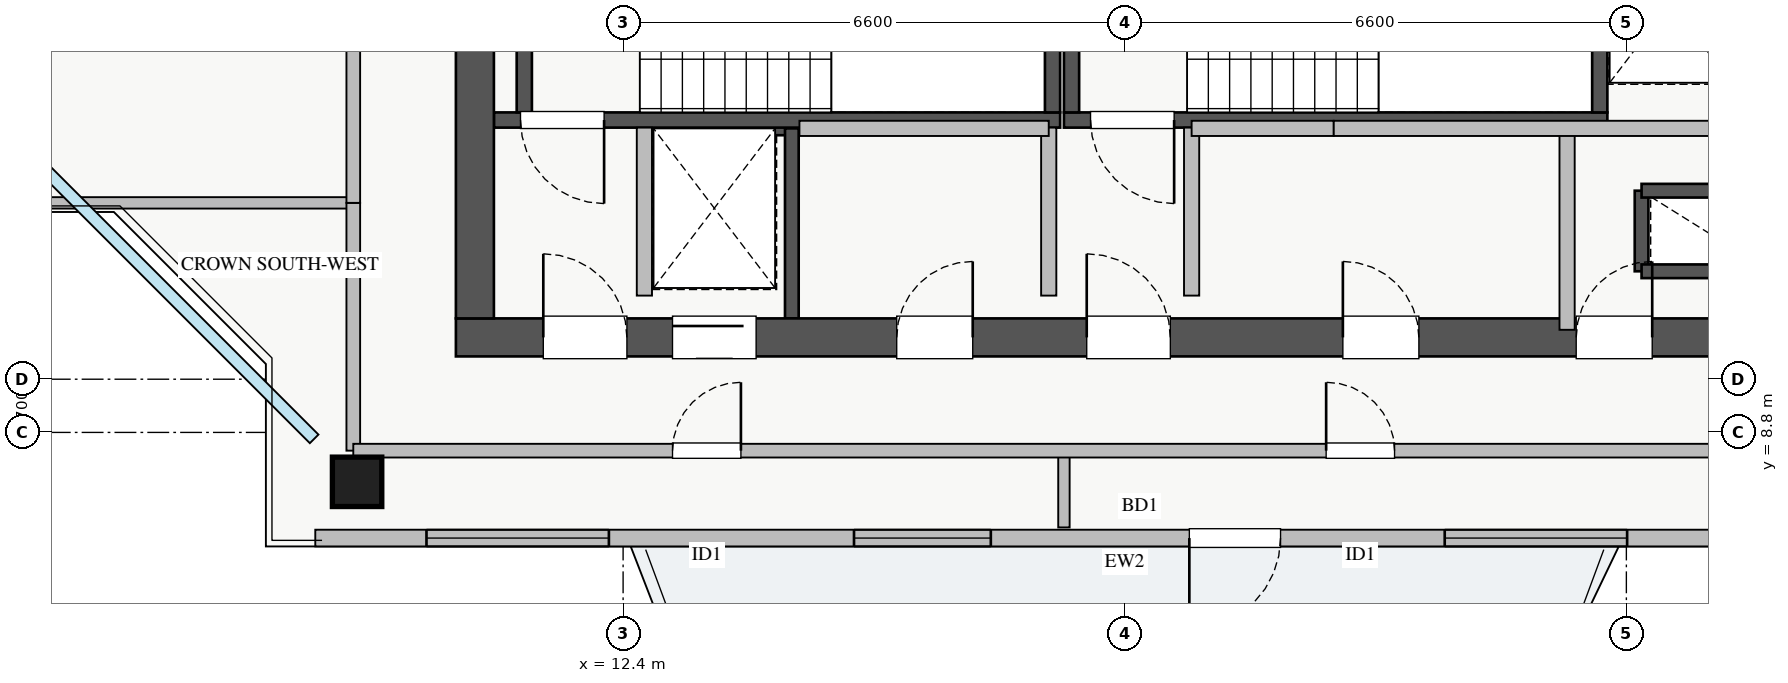
"""IFC4 building model, lengths in metres.
Left out: names, types, materials, properties, quantities, classifications, styles, units other than length and angle.
Written with IfcOpenShell. Run it as: python <this file> out.ifc"""

import sys

from ifc_helpers import new_model, si_unit, direction, frame, frame_2d, origin, origin_2d, place, context, subcontext, project, spatial, rectangle, extrude, source, transform, mapped, element, fill, save


model = new_model("IFC4")
c1 = context("Model", 3, precision=1e-05, world=origin(), true_north=direction((0.0, 1.0)))
c2 = subcontext(c1, "Body", "Model", "MODEL_VIEW")
j1 = project(units=[si_unit("LENGTHUNIT", "METRE"), si_unit("PLANEANGLEUNIT", "RADIAN")], contexts=[c1])
p1 = place(None, origin())
s1 = spatial("IfcSite", under=j1, at=p1, CompositionType="ELEMENT")
p2 = place(p1, origin())
s2 = spatial("IfcBuilding", under=s1, at=p2, CompositionType="ELEMENT")
p3 = place(p2, frame((0.0, 0.0, 247.0)))
s3 = spatial("IfcBuildingStorey", under=s2, at=p3, CompositionType="ELEMENT", Elevation=247.0)
p4 = place(p3, frame((12.68, 12.8, 0.0), z_axis=(0.0, 0.0, 1.0), x_axis=(1.0, 0.0, 0.0)))
e1 = element("IfcWall", 1, at=p4, inside=s3, PredefinedType="SHEAR", context=c2, shape_type="SweptSolid", body=[
    extrude(rectangle(XDim=1.94, YDim=0.18, at=frame_2d((0.97, 0.0))), origin(), (0.0, 0.0, 1.0), 3.07),
])
p5 = place(p3, frame((14.62, 10.3, 0.0), z_axis=(0.0, 0.0, 1.0), x_axis=(0.0, 1.0, 0.0)))
e2 = element("IfcWall", 2, at=p5, inside=s3, PredefinedType="SHEAR", context=c2, shape_type="SweptSolid", body=[
    extrude(rectangle(XDim=2.5, YDim=0.18, at=frame_2d((1.25, 0.0))), origin(), (0.0, 0.0, 1.0), 3.07),
])
p6 = place(p3, frame((25.8, 10.92, 0.0), z_axis=(0.0, 0.0, 1.0), x_axis=(0.0, 1.0, 0.0)))
e3 = element("IfcWall", 3, at=p6, inside=s3, PredefinedType="SHEAR", context=c2, shape_type="SweptSolid", body=[
    extrude(rectangle(XDim=1.06, YDim=0.18, at=frame_2d((0.53, 0.0))), origin(), (0.0, 0.0, 1.0), 3.07),
])
for number, where, z_axis, x_axis in (
    (4, (25.8, 11.98, 0.0), (0.0, 0.0, 1.0), (1.0, 0.0, 0.0)),
    (5, (25.8, 10.92, 0.0), (0.0, 0.0, 1.0), (1.0, 0.0, 0.0)),
):
    element("IfcWall", number, at=place(p3, frame(where, z_axis=z_axis, x_axis=x_axis)), inside=s3, PredefinedType="SHEAR", context=c2, shape_type="SweptSolid", body=[
        extrude(rectangle(XDim=1.5, YDim=0.18, at=frame_2d((0.75, 0.0))), origin(), (0.0, 0.0, 1.0), 3.07),
    ])
p7 = place(p3, frame((10.7, 12.91, 0.0), z_axis=(0.0, 0.0, 1.0), x_axis=(1.0, 0.0, 0.0)))
e6 = element("IfcWall", 6, at=p7, inside=s3, PredefinedType="SHEAR", context=c2, shape_type="SweptSolid", body=[
    extrude(rectangle(XDim=7.45, YDim=0.2, at=frame_2d((3.725, 0.0))), origin(), (0.0, 0.0, 1.0), 3.25),
])
p8 = place(p7, frame((0.35, 0.0, 0.0)))
e7 = element("IfcOpeningElement", 7, at=p8, cuts=e6, PredefinedType="OPENING", context=c2, shape_type="SweptSolid", body=[
    extrude(rectangle(XDim=1.1, YDim=2.05, at=frame_2d((0.55, 1.025))), frame((0.0, 0.11, 0.0), z_axis=(0.0, -1.0, 0.0), x_axis=(1.0, 0.0, 0.0)), (0.0, 0.0, 1.0), 0.22),
])
for number, where, z_axis, x_axis in (
    (8, (11.1, 13.01, 0.0), (0.0, 0.0, 1.0), (0.0, 1.0, 0.0)),
    (9, (18.05, 13.01, 0.0), (0.0, 0.0, 1.0), (0.0, 1.0, 0.0)),
):
    element("IfcWall", number, at=place(p3, frame(where, z_axis=z_axis, x_axis=x_axis)), inside=s3, PredefinedType="SHEAR", context=c2, shape_type="SweptSolid", body=[
        extrude(rectangle(XDim=2.94, YDim=0.2, at=frame_2d((1.47, 0.0))), origin(), (0.0, 0.0, 1.0), 3.25),
    ])
p9 = place(p3, frame((18.2, 12.91, 0.0), z_axis=(0.0, 0.0, 1.0), x_axis=(1.0, 0.0, 0.0)))
e10 = element("IfcWall", 10, at=p9, inside=s3, PredefinedType="SHEAR", context=c2, shape_type="SweptSolid", body=[
    extrude(rectangle(XDim=7.15, YDim=0.2, at=frame_2d((3.575, 0.0))), origin(), (0.0, 0.0, 1.0), 3.25),
])
p10 = place(p9, frame((0.35, 0.0, 0.0)))
e11 = element("IfcOpeningElement", 11, at=p10, cuts=e10, PredefinedType="OPENING", context=c2, shape_type="SweptSolid", body=[
    extrude(rectangle(XDim=1.1, YDim=2.05, at=frame_2d((0.55, 1.025))), frame((0.0, 0.11, 0.0), z_axis=(0.0, -1.0, 0.0), x_axis=(1.0, 0.0, 0.0)), (0.0, 0.0, 1.0), 0.22),
])
for number, where, z_axis, x_axis in (
    (12, (18.3, 13.01, 0.0), (0.0, 0.0, 1.0), (0.0, 1.0, 0.0)),
    (13, (25.25, 13.01, 0.0), (0.0, 0.0, 1.0), (0.0, 1.0, 0.0)),
):
    element("IfcWall", number, at=place(p3, frame(where, z_axis=z_axis, x_axis=x_axis)), inside=s3, PredefinedType="SHEAR", context=c2, shape_type="SweptSolid", body=[
        extrude(rectangle(XDim=2.94, YDim=0.2, at=frame_2d((1.47, 0.0))), origin(), (0.0, 0.0, 1.0), 3.25),
    ])
p11 = place(p3, frame((10.2, 10.05, 0.0), z_axis=(0.0, 0.0, 1.0), x_axis=(1.0, 0.0, 0.0)))
e14 = element("IfcWall", 14, at=p11, inside=s3, PredefinedType="SHEAR", context=c2, shape_type="SweptSolid", body=[
    extrude(rectangle(XDim=17.6, YDim=0.5, at=frame_2d((8.8, 0.0))), origin(), (0.0, 0.0, 1.0), 3.25),
])
p12 = place(p11, frame((1.15, 0.0, 0.0)))
e15 = element("IfcOpeningElement", 15, at=p12, cuts=e14, PredefinedType="OPENING", context=c2, shape_type="SweptSolid", body=[
    extrude(rectangle(XDim=1.1, YDim=2.05, at=frame_2d((0.55, 1.025))), frame((0.0, 0.26, 0.0), z_axis=(0.0, -1.0, 0.0), x_axis=(1.0, 0.0, 0.0)), (0.0, 0.0, 1.0), 0.52),
])
p13 = place(p11, frame((8.3, 0.0, 0.0)))
e16 = element("IfcOpeningElement", 16, at=p13, cuts=e14, PredefinedType="OPENING", context=c2, shape_type="SweptSolid", body=[
    extrude(rectangle(XDim=1.1, YDim=2.05, at=frame_2d((0.55, 1.025))), frame((0.0, 0.26, 0.0), z_axis=(0.0, -1.0, 0.0), x_axis=(1.0, 0.0, 0.0)), (0.0, 0.0, 1.0), 0.52),
])
p14 = place(p11, frame((2.85, 0.0, 0.0)))
e17 = element("IfcOpeningElement", 17, at=p14, cuts=e14, PredefinedType="OPENING", context=c2, shape_type="SweptSolid", body=[
    extrude(rectangle(XDim=1.1, YDim=2.05, at=frame_2d((0.55, 1.025))), frame((0.0, 0.26, 0.0), z_axis=(0.0, -1.0, 0.0), x_axis=(1.0, 0.0, 0.0)), (0.0, 0.0, 1.0), 0.52),
])
p15 = place(p11, frame((5.8, 0.0, 0.0)))
e18 = element("IfcOpeningElement", 18, at=p15, cuts=e14, PredefinedType="OPENING", context=c2, shape_type="SweptSolid", body=[
    extrude(rectangle(XDim=1.0, YDim=2.05, at=frame_2d((0.5, 1.025))), frame((0.0, 0.26, 0.0), z_axis=(0.0, -1.0, 0.0), x_axis=(1.0, 0.0, 0.0)), (0.0, 0.0, 1.0), 0.52),
])
p16 = place(p11, frame((14.74, 0.0, 0.0)))
e19 = element("IfcOpeningElement", 19, at=p16, cuts=e14, PredefinedType="OPENING", context=c2, shape_type="SweptSolid", body=[
    extrude(rectangle(XDim=1.0, YDim=2.05, at=frame_2d((0.5, 1.025))), frame((0.0, 0.26, 0.0), z_axis=(0.0, -1.0, 0.0), x_axis=(1.0, 0.0, 0.0)), (0.0, 0.0, 1.0), 0.52),
])
p17 = place(p11, frame((11.67, 0.0, 0.0)))
e20 = element("IfcOpeningElement", 20, at=p17, cuts=e14, PredefinedType="OPENING", context=c2, shape_type="SweptSolid", body=[
    extrude(rectangle(XDim=1.0, YDim=2.05, at=frame_2d((0.5, 1.025))), frame((0.0, 0.26, 0.0), z_axis=(0.0, -1.0, 0.0), x_axis=(1.0, 0.0, 0.0)), (0.0, 0.0, 1.0), 0.52),
])
p18 = place(p3, frame((10.45, 10.3, 0.0), z_axis=(0.0, 0.0, 1.0), x_axis=(0.0, 1.0, 0.0)))
e21 = element("IfcWall", 21, at=p18, inside=s3, PredefinedType="SHEAR", context=c2, shape_type="SweptSolid", body=[
    extrude(rectangle(XDim=6.2, YDim=0.5, at=frame_2d((3.1, 0.0))), origin(), (0.0, 0.0, 1.0), 3.25),
])
m1 = source(origin(), c2, "Body", "SweptSolid", [
    extrude(rectangle(XDim=0.65, YDim=0.65, at=origin_2d()), origin(), (0.0, 0.0, 1.0), 3.25),
])
p19 = place(p3, frame((8.9, 8.15, 0.0), z_axis=(0.0, 0.0, 1.0), x_axis=(1.0, 0.0, 0.0)))
e22 = element("IfcColumn", 22, at=p19, inside=s3, PredefinedType="COLUMN", context=c2, shape_type="MappedRepresentation", body=[
    mapped(m1, transform((0.0, 0.0, 0.0), x_axis=(1.0, 0.0, 0.0), y_axis=(0.0, 1.0, 0.0), z_axis=(0.0, 0.0, 1.0), scale=1.0)),
])
p20 = place(p3, frame((8.35, 7.41, 0.0), z_axis=(0.0, 0.0, 1.0), x_axis=(1.0, 0.0, 0.0)))
e23 = element("IfcWall", 23, at=p20, inside=s3, PredefinedType="STANDARD", context=c2, shape_type="SweptSolid", body=[
    extrude(rectangle(XDim=21.3, YDim=0.22, at=frame_2d((10.65, 0.0))), origin(), (0.0, 0.0, 1.0), 2.61),
])
p21 = place(p20, frame((11.5, 0.0, 0.0)))
e24 = element("IfcOpeningElement", 24, at=p21, cuts=e23, PredefinedType="OPENING", context=c2, shape_type="SweptSolid", body=[
    extrude(rectangle(XDim=1.2, YDim=2.1, at=frame_2d((0.6, 1.05))), frame((0.0, 0.12, 0.0), z_axis=(0.0, -1.0, 0.0), x_axis=(1.0, 0.0, 0.0)), (0.0, 0.0, 1.0), 0.24),
])
p22 = place(p20, frame((1.463, 0.0, 0.9)))
e25 = element("IfcOpeningElement", 25, at=p22, cuts=e23, PredefinedType="OPENING", context=c2, shape_type="SweptSolid", body=[
    extrude(rectangle(XDim=2.4, YDim=1.48, at=frame_2d((1.2, 0.74))), frame((0.0, 0.12, 0.0), z_axis=(0.0, -1.0, 0.0), x_axis=(1.0, 0.0, 0.0)), (0.0, 0.0, 1.0), 0.24),
])
p23 = place(p20, frame((7.088, 0.0, 0.9)))
e26 = element("IfcOpeningElement", 26, at=p23, cuts=e23, PredefinedType="OPENING", context=c2, shape_type="SweptSolid", body=[
    extrude(rectangle(XDim=1.8, YDim=1.45, at=frame_2d((0.9, 0.725))), frame((0.0, 0.12, 0.0), z_axis=(0.0, -1.0, 0.0), x_axis=(1.0, 0.0, 0.0)), (0.0, 0.0, 1.0), 0.24),
])
p24 = place(p20, frame((19.775, 0.0, 0.9)))
e27 = element("IfcOpeningElement", 27, at=p24, cuts=e23, PredefinedType="OPENING", context=c2, shape_type="SweptSolid", body=[
    extrude(rectangle(XDim=1.2, YDim=1.4, at=frame_2d((0.6, 0.7))), frame((0.0, 0.12, 0.0), z_axis=(0.0, -1.0, 0.0), x_axis=(1.0, 0.0, 0.0)), (0.0, 0.0, 1.0), 0.24),
])
p25 = place(p20, frame((14.86, 0.0, 0.9)))
e28 = element("IfcOpeningElement", 28, at=p25, cuts=e23, PredefinedType="OPENING", context=c2, shape_type="SweptSolid", body=[
    extrude(rectangle(XDim=2.4, YDim=1.5, at=frame_2d((1.2, 0.75))), frame((0.0, 0.12, 0.0), z_axis=(0.0, -1.0, 0.0), x_axis=(1.0, 0.0, 0.0)), (0.0, 0.0, 1.0), 0.24),
])
for number, where, z_axis, x_axis in (
    (29, (12.68, 10.6, 0.0), (0.0, 0.0, 1.0), (0.0, 1.0, 0.0)),
    (30, (18.0, 10.6, 0.0), (0.0, 0.0, 1.0), (0.0, 1.0, 0.0)),
    (31, (19.88, 10.6, 0.0), (0.0, 0.0, 1.0), (0.0, 1.0, 0.0)),
):
    element("IfcWall", number, at=place(p3, frame(where, z_axis=z_axis, x_axis=x_axis)), inside=s3, PredefinedType="PARTITIONING", context=c2, shape_type="SweptSolid", body=[
        extrude(rectangle(XDim=2.21, YDim=0.2, at=frame_2d((1.105, 0.0))), origin(), (0.0, 0.0, 1.0), 3.07),
    ])
p26 = place(p3, frame((14.72, 12.8, 0.0), z_axis=(0.0, 0.0, 1.0), x_axis=(1.0, 0.0, 0.0)))
e32 = element("IfcWall", 32, at=p26, inside=s3, PredefinedType="PARTITIONING", context=c2, shape_type="SweptSolid", body=[
    extrude(rectangle(XDim=3.28, YDim=0.2, at=frame_2d((1.64, 0.0))), origin(), (0.0, 0.0, 1.0), 3.07),
])
p27 = place(p3, frame((24.82, 10.15, 0.0), z_axis=(0.0, 0.0, 1.0), x_axis=(0.0, 1.0, 0.0)))
e33 = element("IfcWall", 33, at=p27, inside=s3, PredefinedType="PARTITIONING", context=c2, shape_type="SweptSolid", body=[
    extrude(rectangle(XDim=2.65, YDim=0.2, at=frame_2d((1.325, 0.0))), origin(), (0.0, 0.0, 1.0), 3.07),
])
p28 = place(p3, frame((19.88, 12.8, 0.0), z_axis=(0.0, 0.0, 1.0), x_axis=(1.0, 0.0, 0.0)))
e34 = element("IfcWall", 34, at=p28, inside=s3, PredefinedType="PARTITIONING", context=c2, shape_type="SweptSolid", body=[
    extrude(rectangle(XDim=1.87, YDim=0.2, at=frame_2d((0.935, 0.0))), origin(), (0.0, 0.0, 1.0), 3.07),
])
p29 = place(p3, frame((21.75, 12.8, 0.0), z_axis=(0.0, 0.0, 1.0), x_axis=(1.0, 0.0, 0.0)))
e35 = element("IfcWall", 35, at=p29, inside=s3, PredefinedType="PARTITIONING", context=c2, shape_type="SweptSolid", body=[
    extrude(rectangle(XDim=5.17, YDim=0.2, at=frame_2d((2.585, 0.0))), origin(), (0.0, 0.0, 1.0), 3.07),
])
p30 = place(p3, frame((3.55, 11.82, 0.0), z_axis=(0.0, 0.0, 1.0), x_axis=(1.0, 0.0, 0.0)))
e36 = element("IfcWall", 36, at=p30, inside=s3, PredefinedType="PARTITIONING", context=c2, shape_type="SweptSolid", body=[
    extrude(rectangle(XDim=5.3, YDim=0.15, at=frame_2d((2.65, 0.0))), origin(), (0.0, 0.0, 1.0), 3.07),
])
p31 = place(p3, frame((8.85, 8.56, 0.0), z_axis=(0.0, 0.0, 1.0), x_axis=(0.0, 1.0, 0.0)))
e37 = element("IfcWall", 37, at=p31, inside=s3, PredefinedType="PARTITIONING", context=c2, shape_type="SweptSolid", body=[
    extrude(rectangle(XDim=3.26, YDim=0.18, at=frame_2d((1.63, 0.0))), origin(), (0.0, 0.0, 1.0), 2.569),
])
p32 = place(p3, frame((18.2, 7.55, 0.0), z_axis=(0.0, 0.0, 1.0), x_axis=(0.0, 1.0, 0.0)))
e38 = element("IfcWall", 38, at=p32, inside=s3, PredefinedType="PARTITIONING", context=c2, shape_type="SweptSolid", body=[
    extrude(rectangle(XDim=1.01, YDim=0.15, at=frame_2d((0.505, 0.0))), origin(), (0.0, 0.0, 1.0), 3.07),
])
p33 = place(p3, frame((8.85, 8.56, 0.0), z_axis=(0.0, 0.0, 1.0), x_axis=(1.0, 0.0, 0.0)))
e39 = element("IfcWall", 39, at=p33, inside=s3, PredefinedType="PARTITIONING", context=c2, shape_type="SweptSolid", body=[
    extrude(rectangle(XDim=18.95, YDim=0.18, at=frame_2d((9.475, 0.0))), origin(), (0.0, 0.0, 1.0), 3.07),
])
p34 = place(p33, frame((4.2, 0.0, 0.0)))
e40 = element("IfcOpeningElement", 40, at=p34, cuts=e39, PredefinedType="OPENING", context=c2, shape_type="SweptSolid", body=[
    extrude(rectangle(XDim=0.9, YDim=2.05, at=frame_2d((0.45, 1.025))), frame((0.0, 0.1, 0.0), z_axis=(0.0, -1.0, 0.0), x_axis=(1.0, 0.0, 0.0)), (0.0, 0.0, 1.0), 0.2),
])
p35 = place(p33, frame((12.8, 0.0, 0.0)))
e41 = element("IfcOpeningElement", 41, at=p35, cuts=e39, PredefinedType="OPENING", context=c2, shape_type="SweptSolid", body=[
    extrude(rectangle(XDim=0.9, YDim=2.05, at=frame_2d((0.45, 1.025))), frame((0.0, 0.1, 0.0), z_axis=(0.0, -1.0, 0.0), x_axis=(1.0, 0.0, 0.0)), (0.0, 0.0, 1.0), 0.2),
])
p36 = place(p3, frame((8.85, 11.82, 0.0), z_axis=(0.0, 0.0, 1.0), x_axis=(0.0, 1.0, 0.0)))
e42 = element("IfcWall", 42, at=p36, inside=s3, PredefinedType="PARTITIONING", context=c2, shape_type="SweptSolid", body=[
    extrude(rectangle(XDim=22.36, YDim=0.18, at=frame_2d((11.18, 0.0))), origin(), (0.0, 0.0, 1.0), 2.569),
])
p37 = place(p36, frame((2.475, 0.0, 0.0)))
e43 = element("IfcOpeningElement", 43, at=p37, cuts=e42, PredefinedType="OPENING", context=c2, shape_type="SweptSolid", body=[
    extrude(rectangle(XDim=1.0, YDim=2.05, at=frame_2d((0.5, 1.025))), frame((0.0, 0.1, 0.0), z_axis=(0.0, -1.0, 0.0), x_axis=(1.0, 0.0, 0.0)), (0.0, 0.0, 1.0), 0.2),
])
p38 = place(p36, frame((13.91, 0.0, 0.0)))
e44 = element("IfcOpeningElement", 44, at=p38, cuts=e42, PredefinedType="OPENING", context=c2, shape_type="SweptSolid", body=[
    extrude(rectangle(XDim=1.0, YDim=2.05, at=frame_2d((0.5, 1.025))), frame((0.0, 0.1, 0.0), z_axis=(0.0, -1.0, 0.0), x_axis=(1.0, 0.0, 0.0)), (0.0, 0.0, 1.0), 0.2),
])
m2 = source(origin(), c2, "Body", "SweptSolid", [
    extrude(rectangle(XDim=1.2, YDim=2.1, at=frame_2d((0.6, 1.05))), frame((0.0, 0.025, 0.0), z_axis=(0.0, -1.0, 0.0), x_axis=(1.0, 0.0, 0.0)), (0.0, 0.0, 1.0), 0.05),
])
p39 = place(p21, frame((1.2, 0.0, 0.0), z_axis=(0.0, 0.0, 1.0), x_axis=(-1.0, 0.0, 0.0)))
e45 = element("IfcDoor", 45, at=p39, inside=s3, OperationType="SINGLE_SWING_LEFT", PredefinedType="DOOR", context=c2, shape_type="MappedRepresentation", body=[
    mapped(m2, transform((0.0, 0.0, 0.0), x_axis=(1.0, 0.0, 0.0), y_axis=(0.0, 1.0, 0.0), z_axis=(0.0, 0.0, 1.0), scale=1.0)),
])
fill(e24, e45)
m3 = source(origin(), c2, "Body", "SweptSolid", [
    extrude(rectangle(XDim=2.4, YDim=1.48, at=frame_2d((1.2, 0.74))), frame((0.0, 0.03, 0.0), z_axis=(0.0, -1.0, 0.0), x_axis=(1.0, 0.0, 0.0)), (0.0, 0.0, 1.0), 0.06),
])
p40 = place(p22, origin())
e46 = element("IfcWindow", 46, at=p40, inside=s3, PartitioningType="TRIPLE_PANEL_VERTICAL", PredefinedType="WINDOW", context=c2, shape_type="MappedRepresentation", body=[
    mapped(m3, transform((0.0, 0.0, 0.0), x_axis=(1.0, 0.0, 0.0), y_axis=(0.0, 1.0, 0.0), z_axis=(0.0, 0.0, 1.0), scale=1.0)),
])
fill(e25, e46)
m4 = source(origin(), c2, "Body", "SweptSolid", [
    extrude(rectangle(XDim=1.8, YDim=1.45, at=frame_2d((0.9, 0.725))), frame((0.0, 0.03, 0.0), z_axis=(0.0, -1.0, 0.0), x_axis=(1.0, 0.0, 0.0)), (0.0, 0.0, 1.0), 0.06),
])
p41 = place(p23, origin())
e47 = element("IfcWindow", 47, at=p41, inside=s3, PartitioningType="DOUBLE_PANEL_VERTICAL", PredefinedType="WINDOW", context=c2, shape_type="MappedRepresentation", body=[
    mapped(m4, transform((0.0, 0.0, 0.0), x_axis=(1.0, 0.0, 0.0), y_axis=(0.0, 1.0, 0.0), z_axis=(0.0, 0.0, 1.0), scale=1.0)),
])
fill(e26, e47)
m5 = source(origin(), c2, "Body", "SweptSolid", [
    extrude(rectangle(XDim=1.1, YDim=2.05, at=frame_2d((0.55, 1.025))), frame((0.0, 0.025, 0.0), z_axis=(0.0, -1.0, 0.0), x_axis=(1.0, 0.0, 0.0)), (0.0, 0.0, 1.0), 0.05),
])
p42 = place(p12, origin())
e48 = element("IfcDoor", 48, at=p42, inside=s3, OperationType="SINGLE_SWING_LEFT", PredefinedType="DOOR", context=c2, shape_type="MappedRepresentation", body=[
    mapped(m5, transform((0.0, 0.0, 0.0), x_axis=(1.0, 0.0, 0.0), y_axis=(0.0, 1.0, 0.0), z_axis=(0.0, 0.0, 1.0), scale=1.0)),
])
fill(e15, e48)
p43 = place(p8, frame((1.1, 0.0, 0.0), z_axis=(0.0, 0.0, 1.0), x_axis=(-1.0, 0.0, 0.0)))
e49 = element("IfcDoor", 49, at=p43, inside=s3, OperationType="SINGLE_SWING_RIGHT", PredefinedType="DOOR", context=c2, shape_type="MappedRepresentation", body=[
    mapped(m5, transform((0.0, 0.0, 0.0), x_axis=(1.0, 0.0, 0.0), y_axis=(0.0, 1.0, 0.0), z_axis=(0.0, 0.0, 1.0), scale=1.0)),
])
fill(e7, e49)
p44 = place(p13, origin())
e50 = element("IfcDoor", 50, at=p44, inside=s3, OperationType="SINGLE_SWING_LEFT", PredefinedType="DOOR", context=c2, shape_type="MappedRepresentation", body=[
    mapped(m5, transform((0.0, 0.0, 0.0), x_axis=(1.0, 0.0, 0.0), y_axis=(0.0, 1.0, 0.0), z_axis=(0.0, 0.0, 1.0), scale=1.0)),
])
fill(e16, e50)
p45 = place(p10, frame((1.1, 0.0, 0.0), z_axis=(0.0, 0.0, 1.0), x_axis=(-1.0, 0.0, 0.0)))
e51 = element("IfcDoor", 51, at=p45, inside=s3, OperationType="SINGLE_SWING_RIGHT", PredefinedType="DOOR", context=c2, shape_type="MappedRepresentation", body=[
    mapped(m5, transform((0.0, 0.0, 0.0), x_axis=(1.0, 0.0, 0.0), y_axis=(0.0, 1.0, 0.0), z_axis=(0.0, 0.0, 1.0), scale=1.0)),
])
fill(e11, e51)
p46 = place(p14, origin())
e52 = element("IfcDoor", 52, at=p46, inside=s3, OperationType="SLIDING_TO_RIGHT", PredefinedType="DOOR", context=c2, shape_type="MappedRepresentation", body=[
    mapped(m5, transform((0.0, 0.0, 0.0), x_axis=(1.0, 0.0, 0.0), y_axis=(0.0, 1.0, 0.0), z_axis=(0.0, 0.0, 1.0), scale=1.0)),
])
fill(e17, e52)
m6 = source(origin(), c2, "Body", "SweptSolid", [
    extrude(rectangle(XDim=1.0, YDim=2.05, at=frame_2d((0.5, 1.025))), frame((0.0, 0.025, 0.0), z_axis=(0.0, -1.0, 0.0), x_axis=(1.0, 0.0, 0.0)), (0.0, 0.0, 1.0), 0.05),
])
p47 = place(p15, origin())
e53 = element("IfcDoor", 53, at=p47, inside=s3, OperationType="SINGLE_SWING_RIGHT", PredefinedType="DOOR", context=c2, shape_type="MappedRepresentation", body=[
    mapped(m6, transform((0.0, 0.0, 0.0), x_axis=(1.0, 0.0, 0.0), y_axis=(0.0, 1.0, 0.0), z_axis=(0.0, 0.0, 1.0), scale=1.0)),
])
fill(e18, e53)
p48 = place(p16, origin())
e54 = element("IfcDoor", 54, at=p48, inside=s3, OperationType="SINGLE_SWING_RIGHT", PredefinedType="DOOR", context=c2, shape_type="MappedRepresentation", body=[
    mapped(m6, transform((0.0, 0.0, 0.0), x_axis=(1.0, 0.0, 0.0), y_axis=(0.0, 1.0, 0.0), z_axis=(0.0, 0.0, 1.0), scale=1.0)),
])
fill(e19, e54)
p49 = place(p17, origin())
e55 = element("IfcDoor", 55, at=p49, inside=s3, OperationType="SINGLE_SWING_LEFT", PredefinedType="DOOR", context=c2, shape_type="MappedRepresentation", body=[
    mapped(m6, transform((0.0, 0.0, 0.0), x_axis=(1.0, 0.0, 0.0), y_axis=(0.0, 1.0, 0.0), z_axis=(0.0, 0.0, 1.0), scale=1.0)),
])
fill(e20, e55)
m7 = source(origin(), c2, "Body", "SweptSolid", [
    extrude(rectangle(XDim=0.9, YDim=2.05, at=frame_2d((0.45, 1.025))), frame((0.0, 0.025, 0.0), z_axis=(0.0, -1.0, 0.0), x_axis=(1.0, 0.0, 0.0)), (0.0, 0.0, 1.0), 0.05),
])
p50 = place(p34, origin())
e56 = element("IfcDoor", 56, at=p50, inside=s3, OperationType="SINGLE_SWING_RIGHT", PredefinedType="DOOR", context=c2, shape_type="MappedRepresentation", body=[
    mapped(m7, transform((0.0, 0.0, 0.0), x_axis=(1.0, 0.0, 0.0), y_axis=(0.0, 1.0, 0.0), z_axis=(0.0, 0.0, 1.0), scale=1.0)),
])
fill(e40, e56)
p51 = place(p35, origin())
e57 = element("IfcDoor", 57, at=p51, inside=s3, OperationType="SINGLE_SWING_LEFT", PredefinedType="DOOR", context=c2, shape_type="MappedRepresentation", body=[
    mapped(m7, transform((0.0, 0.0, 0.0), x_axis=(1.0, 0.0, 0.0), y_axis=(0.0, 1.0, 0.0), z_axis=(0.0, 0.0, 1.0), scale=1.0)),
])
fill(e41, e57)
m8 = source(origin(), c2, "Body", "SweptSolid", [
    extrude(rectangle(XDim=2.4, YDim=1.5, at=frame_2d((1.2, 0.75))), frame((0.0, 0.03, 0.0), z_axis=(0.0, -1.0, 0.0), x_axis=(1.0, 0.0, 0.0)), (0.0, 0.0, 1.0), 0.06),
])
p52 = place(p25, origin())
e58 = element("IfcWindow", 58, at=p52, inside=s3, PartitioningType="TRIPLE_PANEL_VERTICAL", PredefinedType="WINDOW", context=c2, shape_type="MappedRepresentation", body=[
    mapped(m8, transform((0.0, 0.0, 0.0), x_axis=(1.0, 0.0, 0.0), y_axis=(0.0, 1.0, 0.0), z_axis=(0.0, 0.0, 1.0), scale=1.0)),
])
fill(e28, e58)
save(model, sys.argv[1])
